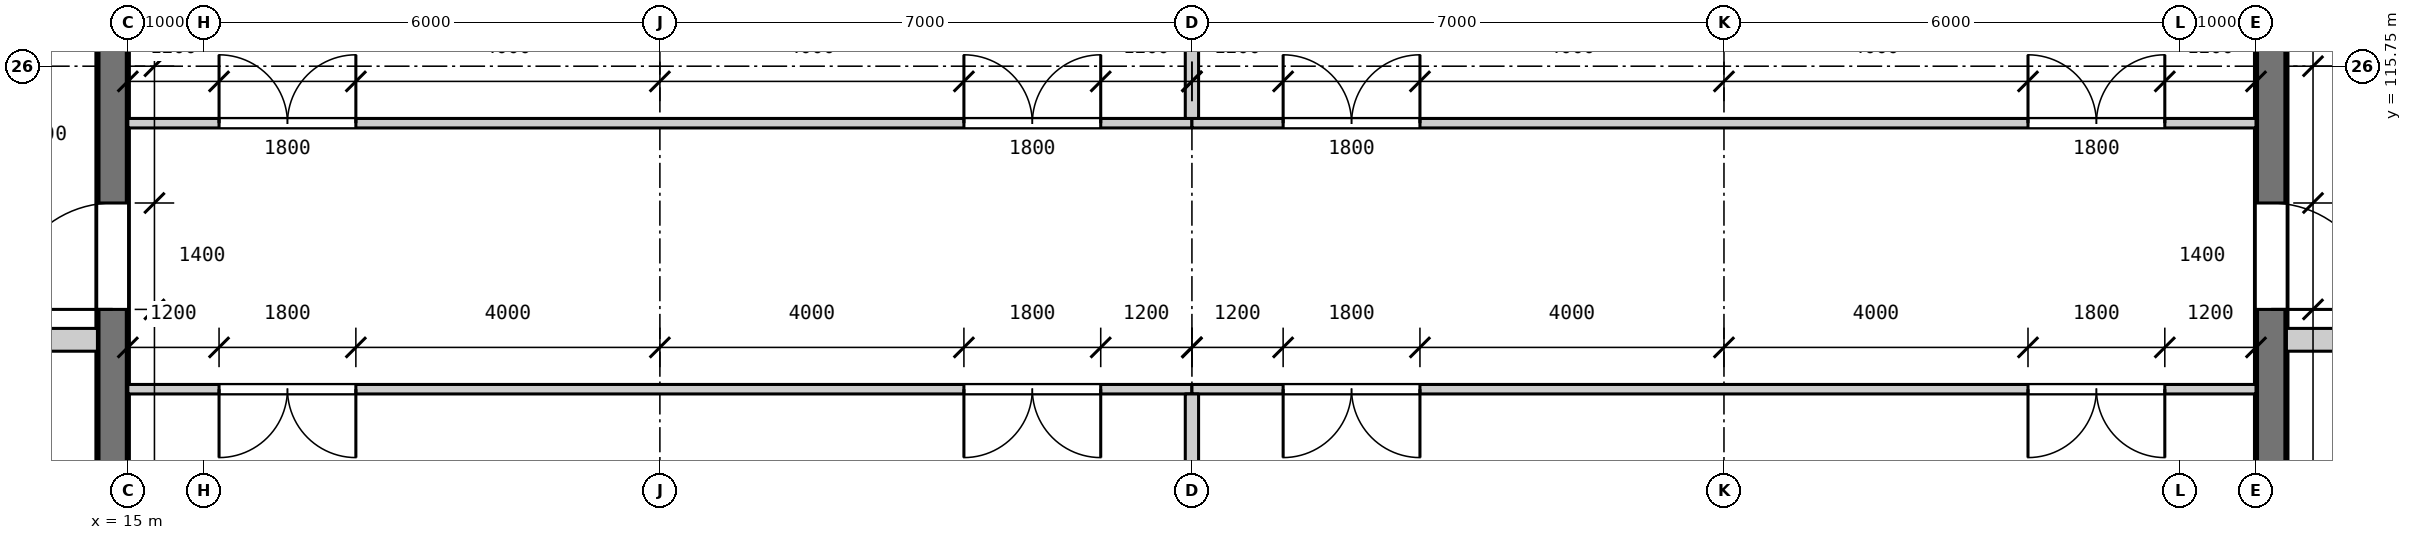
"""IFC4 building model, lengths in metres.
Left out: names, types, materials, properties, quantities, classifications, styles, units other than length and angle.
Written with IfcOpenShell. Run it as: python <this file> out.ifc"""

import sys

from ifc_helpers import new_model, si_unit, direction, frame, frame_2d, origin, place, context, subcontext, project, spatial, rectangle, extrude, element, fill, save


model = new_model("IFC4")
c1 = context("Model", 3, precision=1e-05, world=origin(), true_north=direction((0.0, 1.0)))
c2 = subcontext(c1, "Body", "Model", "MODEL_VIEW")
j1 = project(units=[si_unit("LENGTHUNIT", "METRE"), si_unit("PLANEANGLEUNIT", "RADIAN")], contexts=[c1])
p1 = place(None, origin())
s1 = spatial("IfcSite", under=j1, at=p1, CompositionType="ELEMENT")
p2 = place(p1, origin())
s2 = spatial("IfcBuilding", under=s1, at=p2, CompositionType="ELEMENT")
p3 = place(p2, frame((0.0, 0.0, 6.0)))
s3 = spatial("IfcBuildingStorey", under=s2, at=p3, CompositionType="ELEMENT", Elevation=6.0)
p4 = place(p3, frame((14.8, 99.0, 0.0), z_axis=(0.0, 0.0, 1.0), x_axis=(0.0, 1.0, 0.0)))
e1 = element("IfcWall", 1, at=p4, inside=s3, PredefinedType="SHEAR", context=c2, shape_type="SweptSolid", body=[
    extrude(rectangle(XDim=26.55, YDim=0.4, at=frame_2d((13.275, 0.0))), origin(), (0.0, 0.0, 1.0), 4.2),
])
p5 = place(p4, frame((13.55, 0.0, 0.0)))
e2 = element("IfcOpeningElement", 2, at=p5, cuts=e1, PredefinedType="OPENING", context=c2, shape_type="SweptSolid", body=[
    extrude(rectangle(XDim=1.4, YDim=2.4, at=frame_2d((0.7, 1.2))), frame((0.0, 0.21, 0.0), z_axis=(0.0, -1.0, 0.0), x_axis=(1.0, 0.0, 0.0)), (0.0, 0.0, 1.0), 0.42),
])
p6 = place(p3, frame((43.2, 99.0, 0.0), z_axis=(0.0, 0.0, 1.0), x_axis=(0.0, 1.0, 0.0)))
e3 = element("IfcWall", 3, at=p6, inside=s3, PredefinedType="SHEAR", context=c2, shape_type="SweptSolid", body=[
    extrude(rectangle(XDim=26.55, YDim=0.4, at=frame_2d((13.275, 0.0))), origin(), (0.0, 0.0, 1.0), 4.2),
])
p7 = place(p6, frame((13.55, 0.0, 0.0)))
e4 = element("IfcOpeningElement", 4, at=p7, cuts=e3, PredefinedType="OPENING", context=c2, shape_type="SweptSolid", body=[
    extrude(rectangle(XDim=1.4, YDim=2.4, at=frame_2d((0.7, 1.2))), frame((0.0, 0.21, 0.0), z_axis=(0.0, -1.0, 0.0), x_axis=(1.0, 0.0, 0.0)), (0.0, 0.0, 1.0), 0.42),
])
for number, where, z_axis, x_axis in (
    (5, (12.65, 112.15, 0.0), (0.0, 0.0, 1.0), (1.0, 0.0, 0.0)),
    (6, (43.4, 112.15, 0.0), (0.0, 0.0, 1.0), (1.0, 0.0, 0.0)),
):
    element("IfcWall", number, at=place(p3, frame(where, z_axis=z_axis, x_axis=x_axis)), inside=s3, PredefinedType="PARTITIONING", context=c2, shape_type="SweptSolid", body=[
        extrude(rectangle(XDim=1.95, YDim=0.3, at=frame_2d((0.975, 0.0))), origin(), (0.0, 0.0, 1.0), 3.9),
    ])
p8 = place(p3, frame((15.0, 111.5, 0.0), z_axis=(0.0, 0.0, 1.0), x_axis=(1.0, 0.0, 0.0)))
e7 = element("IfcWall", 7, at=p8, inside=s3, PredefinedType="PARTITIONING", context=c2, shape_type="SweptSolid", body=[
    extrude(rectangle(XDim=14.0, YDim=0.125, at=frame_2d((7.0, 0.0))), origin(), (0.0, 0.0, 1.0), 3.9),
])
p9 = place(p8, frame((1.2, 0.0, 0.0)))
e8 = element("IfcOpeningElement", 8, at=p9, cuts=e7, PredefinedType="OPENING", context=c2, shape_type="SweptSolid", body=[
    extrude(rectangle(XDim=1.8, YDim=2.1, at=frame_2d((0.9, 1.05))), frame((0.0, 0.073, 0.0), z_axis=(0.0, -1.0, 0.0), x_axis=(1.0, 0.0, 0.0)), (0.0, 0.0, 1.0), 0.145),
])
p10 = place(p8, frame((11.0, 0.0, 0.0)))
e9 = element("IfcOpeningElement", 9, at=p10, cuts=e7, PredefinedType="OPENING", context=c2, shape_type="SweptSolid", body=[
    extrude(rectangle(XDim=1.8, YDim=2.1, at=frame_2d((0.9, 1.05))), frame((0.0, 0.073, 0.0), z_axis=(0.0, -1.0, 0.0), x_axis=(1.0, 0.0, 0.0)), (0.0, 0.0, 1.0), 0.145),
])
p11 = place(p3, frame((29.0, 111.5, 0.0), z_axis=(0.0, 0.0, 1.0), x_axis=(1.0, 0.0, 0.0)))
e10 = element("IfcWall", 10, at=p11, inside=s3, PredefinedType="PARTITIONING", context=c2, shape_type="SweptSolid", body=[
    extrude(rectangle(XDim=14.0, YDim=0.125, at=frame_2d((7.0, 0.0))), origin(), (0.0, 0.0, 1.0), 3.9),
])
p12 = place(p11, frame((1.2, 0.0, 0.0)))
e11 = element("IfcOpeningElement", 11, at=p12, cuts=e10, PredefinedType="OPENING", context=c2, shape_type="SweptSolid", body=[
    extrude(rectangle(XDim=1.8, YDim=2.1, at=frame_2d((0.9, 1.05))), frame((0.0, 0.073, 0.0), z_axis=(0.0, -1.0, 0.0), x_axis=(1.0, 0.0, 0.0)), (0.0, 0.0, 1.0), 0.145),
])
p13 = place(p11, frame((11.0, 0.0, 0.0)))
e12 = element("IfcOpeningElement", 12, at=p13, cuts=e10, PredefinedType="OPENING", context=c2, shape_type="SweptSolid", body=[
    extrude(rectangle(XDim=1.8, YDim=2.1, at=frame_2d((0.9, 1.05))), frame((0.0, 0.073, 0.0), z_axis=(0.0, -1.0, 0.0), x_axis=(1.0, 0.0, 0.0)), (0.0, 0.0, 1.0), 0.145),
])
p14 = place(p3, frame((15.0, 115.0, 0.0), z_axis=(0.0, 0.0, 1.0), x_axis=(1.0, 0.0, 0.0)))
e13 = element("IfcWall", 13, at=p14, inside=s3, PredefinedType="PARTITIONING", context=c2, shape_type="SweptSolid", body=[
    extrude(rectangle(XDim=14.0, YDim=0.125, at=frame_2d((7.0, 0.0))), origin(), (0.0, 0.0, 1.0), 3.9),
])
p15 = place(p14, frame((1.2, 0.0, 0.0)))
e14 = element("IfcOpeningElement", 14, at=p15, cuts=e13, PredefinedType="OPENING", context=c2, shape_type="SweptSolid", body=[
    extrude(rectangle(XDim=1.8, YDim=2.1, at=frame_2d((0.9, 1.05))), frame((0.0, 0.073, 0.0), z_axis=(0.0, -1.0, 0.0), x_axis=(1.0, 0.0, 0.0)), (0.0, 0.0, 1.0), 0.145),
])
p16 = place(p14, frame((11.0, 0.0, 0.0)))
e15 = element("IfcOpeningElement", 15, at=p16, cuts=e13, PredefinedType="OPENING", context=c2, shape_type="SweptSolid", body=[
    extrude(rectangle(XDim=1.8, YDim=2.1, at=frame_2d((0.9, 1.05))), frame((0.0, 0.073, 0.0), z_axis=(0.0, -1.0, 0.0), x_axis=(1.0, 0.0, 0.0)), (0.0, 0.0, 1.0), 0.145),
])
p17 = place(p3, frame((29.0, 115.0, 0.0), z_axis=(0.0, 0.0, 1.0), x_axis=(1.0, 0.0, 0.0)))
e16 = element("IfcWall", 16, at=p17, inside=s3, PredefinedType="PARTITIONING", context=c2, shape_type="SweptSolid", body=[
    extrude(rectangle(XDim=14.0, YDim=0.125, at=frame_2d((7.0, 0.0))), origin(), (0.0, 0.0, 1.0), 3.9),
])
p18 = place(p17, frame((1.2, 0.0, 0.0)))
e17 = element("IfcOpeningElement", 17, at=p18, cuts=e16, PredefinedType="OPENING", context=c2, shape_type="SweptSolid", body=[
    extrude(rectangle(XDim=1.8, YDim=2.1, at=frame_2d((0.9, 1.05))), frame((0.0, 0.073, 0.0), z_axis=(0.0, -1.0, 0.0), x_axis=(1.0, 0.0, 0.0)), (0.0, 0.0, 1.0), 0.145),
])
p19 = place(p17, frame((11.0, 0.0, 0.0)))
e18 = element("IfcOpeningElement", 18, at=p19, cuts=e16, PredefinedType="OPENING", context=c2, shape_type="SweptSolid", body=[
    extrude(rectangle(XDim=1.8, YDim=2.1, at=frame_2d((0.9, 1.05))), frame((0.0, 0.073, 0.0), z_axis=(0.0, -1.0, 0.0), x_axis=(1.0, 0.0, 0.0)), (0.0, 0.0, 1.0), 0.145),
])
p20 = place(p3, frame((29.0, 108.4, 0.0), z_axis=(0.0, 0.0, 1.0), x_axis=(0.0, 1.0, 0.0)))
e19 = element("IfcWall", 19, at=p20, inside=s3, PredefinedType="PARTITIONING", context=c2, shape_type="SweptSolid", body=[
    extrude(rectangle(XDim=3.038, YDim=0.175, at=frame_2d((1.519, 0.0))), origin(), (0.0, 0.0, 1.0), 2.9),
])
p21 = place(p3, frame((29.0, 115.062, 0.0), z_axis=(0.0, 0.0, 1.0), x_axis=(0.0, 1.0, 0.0)))
e20 = element("IfcWall", 20, at=p21, inside=s3, PredefinedType="PARTITIONING", context=c2, shape_type="SweptSolid", body=[
    extrude(rectangle(XDim=1.538, YDim=0.175, at=frame_2d((0.769, 0.0))), origin(), (0.0, 0.0, 1.0), 2.9),
])
p22 = place(p9, frame((1.8, 0.0, 0.0), z_axis=(0.0, 0.0, 1.0), x_axis=(-1.0, 0.0, 0.0)))
e21 = element("IfcDoor", 21, at=p22, inside=s3, OperationType="DOUBLE_DOOR_SINGLE_SWING", PredefinedType="DOOR", context=c2, shape_type="SweptSolid", body=[
    extrude(rectangle(XDim=1.8, YDim=2.1, at=frame_2d((0.9, 1.05))), frame((0.0, 0.025, 0.0), z_axis=(0.0, -1.0, 0.0), x_axis=(1.0, 0.0, 0.0)), (0.0, 0.0, 1.0), 0.05),
])
fill(e8, e21)
p23 = place(p10, frame((1.8, 0.0, 0.0), z_axis=(0.0, 0.0, 1.0), x_axis=(-1.0, 0.0, 0.0)))
e22 = element("IfcDoor", 22, at=p23, inside=s3, OperationType="DOUBLE_DOOR_SINGLE_SWING", PredefinedType="DOOR", context=c2, shape_type="SweptSolid", body=[
    extrude(rectangle(XDim=1.8, YDim=2.1, at=frame_2d((0.9, 1.05))), frame((0.0, 0.025, 0.0), z_axis=(0.0, -1.0, 0.0), x_axis=(1.0, 0.0, 0.0)), (0.0, 0.0, 1.0), 0.05),
])
fill(e9, e22)
p24 = place(p12, frame((1.8, 0.0, 0.0), z_axis=(0.0, 0.0, 1.0), x_axis=(-1.0, 0.0, 0.0)))
e23 = element("IfcDoor", 23, at=p24, inside=s3, OperationType="DOUBLE_DOOR_SINGLE_SWING", PredefinedType="DOOR", context=c2, shape_type="SweptSolid", body=[
    extrude(rectangle(XDim=1.8, YDim=2.1, at=frame_2d((0.9, 1.05))), frame((0.0, 0.025, 0.0), z_axis=(0.0, -1.0, 0.0), x_axis=(1.0, 0.0, 0.0)), (0.0, 0.0, 1.0), 0.05),
])
fill(e11, e23)
p25 = place(p13, frame((1.8, 0.0, 0.0), z_axis=(0.0, 0.0, 1.0), x_axis=(-1.0, 0.0, 0.0)))
e24 = element("IfcDoor", 24, at=p25, inside=s3, OperationType="DOUBLE_DOOR_SINGLE_SWING", PredefinedType="DOOR", context=c2, shape_type="SweptSolid", body=[
    extrude(rectangle(XDim=1.8, YDim=2.1, at=frame_2d((0.9, 1.05))), frame((0.0, 0.025, 0.0), z_axis=(0.0, -1.0, 0.0), x_axis=(1.0, 0.0, 0.0)), (0.0, 0.0, 1.0), 0.05),
])
fill(e12, e24)
p26 = place(p5, origin())
e25 = element("IfcDoor", 25, at=p26, inside=s3, OperationType="SINGLE_SWING_LEFT", PredefinedType="DOOR", context=c2, shape_type="SweptSolid", body=[
    extrude(rectangle(XDim=1.4, YDim=2.4, at=frame_2d((0.7, 1.2))), frame((0.0, 0.025, 0.0), z_axis=(0.0, -1.0, 0.0), x_axis=(1.0, 0.0, 0.0)), (0.0, 0.0, 1.0), 0.05),
])
fill(e2, e25)
p27 = place(p7, frame((1.4, 0.0, 0.0), z_axis=(0.0, 0.0, 1.0), x_axis=(-1.0, 0.0, 0.0)))
e26 = element("IfcDoor", 26, at=p27, inside=s3, OperationType="SINGLE_SWING_RIGHT", PredefinedType="DOOR", context=c2, shape_type="SweptSolid", body=[
    extrude(rectangle(XDim=1.4, YDim=2.4, at=frame_2d((0.7, 1.2))), frame((0.0, 0.025, 0.0), z_axis=(0.0, -1.0, 0.0), x_axis=(1.0, 0.0, 0.0)), (0.0, 0.0, 1.0), 0.05),
])
fill(e4, e26)
p28 = place(p15, origin())
e27 = element("IfcDoor", 27, at=p28, inside=s3, OperationType="DOUBLE_DOOR_SINGLE_SWING", PredefinedType="DOOR", context=c2, shape_type="SweptSolid", body=[
    extrude(rectangle(XDim=1.8, YDim=2.1, at=frame_2d((0.9, 1.05))), frame((0.0, 0.025, 0.0), z_axis=(0.0, -1.0, 0.0), x_axis=(1.0, 0.0, 0.0)), (0.0, 0.0, 1.0), 0.05),
])
fill(e14, e27)
p29 = place(p16, origin())
e28 = element("IfcDoor", 28, at=p29, inside=s3, OperationType="DOUBLE_DOOR_SINGLE_SWING", PredefinedType="DOOR", context=c2, shape_type="SweptSolid", body=[
    extrude(rectangle(XDim=1.8, YDim=2.1, at=frame_2d((0.9, 1.05))), frame((0.0, 0.025, 0.0), z_axis=(0.0, -1.0, 0.0), x_axis=(1.0, 0.0, 0.0)), (0.0, 0.0, 1.0), 0.05),
])
fill(e15, e28)
p30 = place(p18, origin())
e29 = element("IfcDoor", 29, at=p30, inside=s3, OperationType="DOUBLE_DOOR_SINGLE_SWING", PredefinedType="DOOR", context=c2, shape_type="SweptSolid", body=[
    extrude(rectangle(XDim=1.8, YDim=2.1, at=frame_2d((0.9, 1.05))), frame((0.0, 0.025, 0.0), z_axis=(0.0, -1.0, 0.0), x_axis=(1.0, 0.0, 0.0)), (0.0, 0.0, 1.0), 0.05),
])
fill(e17, e29)
p31 = place(p19, origin())
e30 = element("IfcDoor", 30, at=p31, inside=s3, OperationType="DOUBLE_DOOR_SINGLE_SWING", PredefinedType="DOOR", context=c2, shape_type="SweptSolid", body=[
    extrude(rectangle(XDim=1.8, YDim=2.1, at=frame_2d((0.9, 1.05))), frame((0.0, 0.025, 0.0), z_axis=(0.0, -1.0, 0.0), x_axis=(1.0, 0.0, 0.0)), (0.0, 0.0, 1.0), 0.05),
])
fill(e18, e30)
save(model, sys.argv[1])
